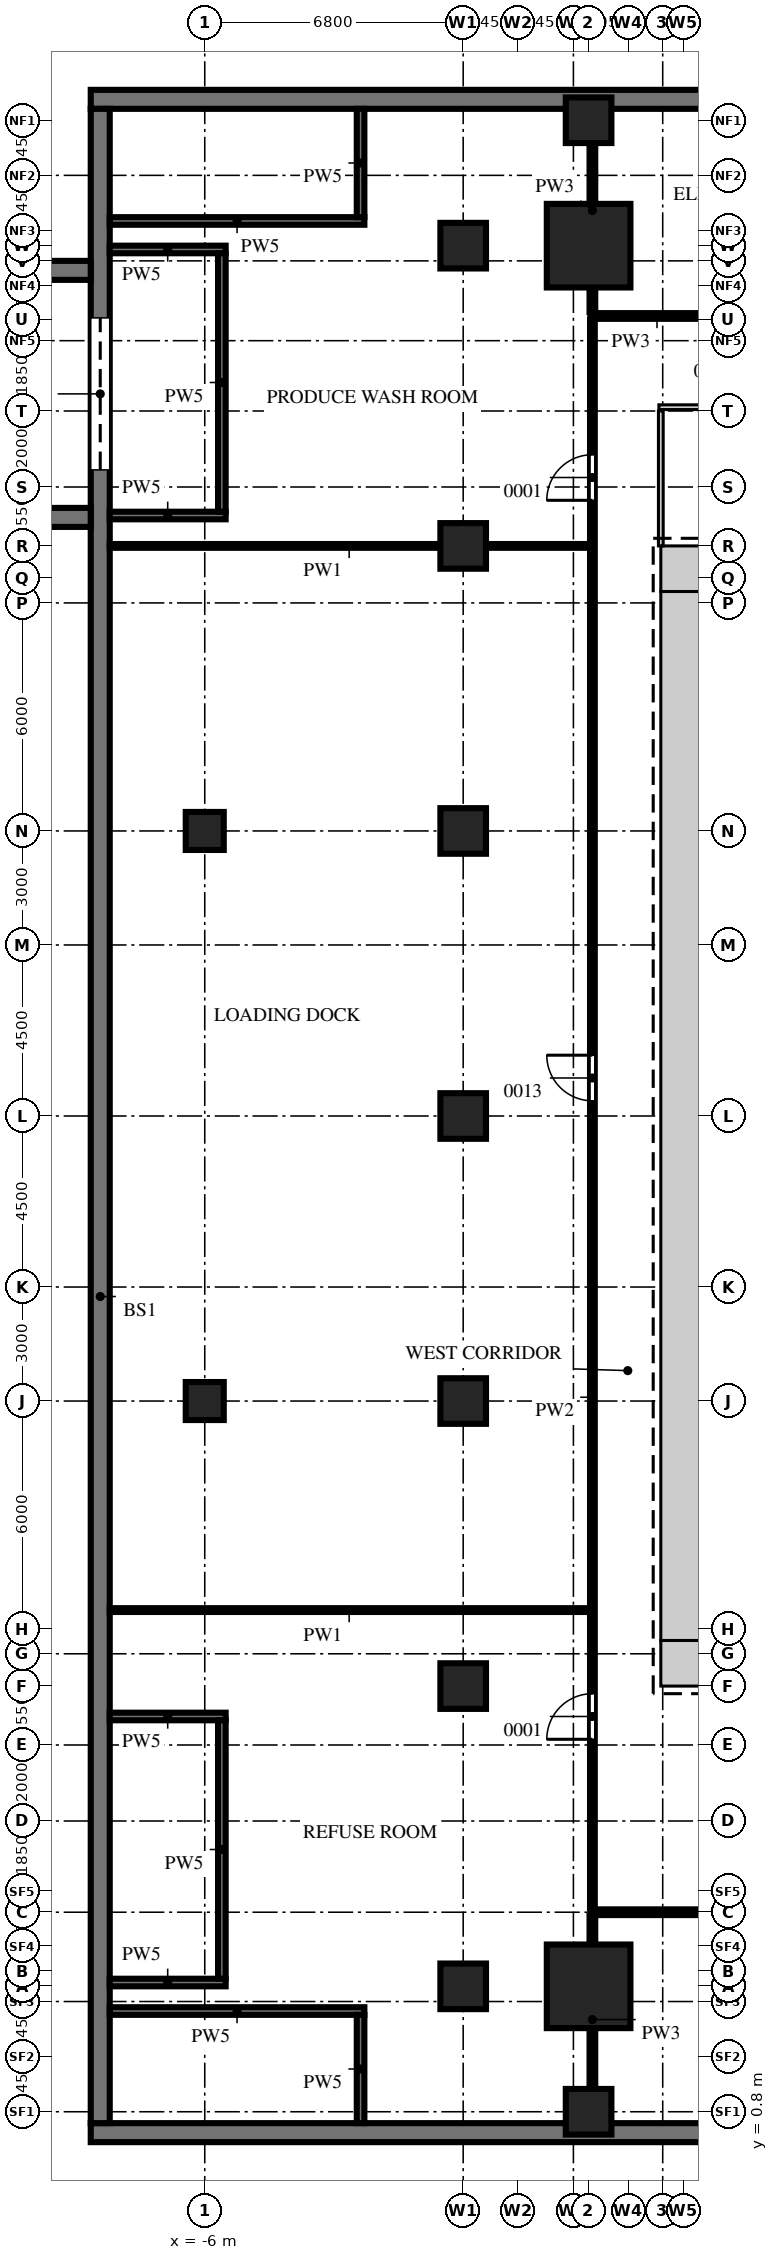
"""IFC4 building model, lengths in metres.
Left out: names, types, materials, properties, quantities, classifications, styles, units other than length and angle.
Written with IfcOpenShell. Run it as: python <this file> out.ifc"""

import sys

from ifc_helpers import new_model, si_unit, direction, frame, frame_2d, origin, origin_2d, place, context, subcontext, project, spatial, rectangle, extrude, source, transform, mapped, element, fill, save


model = new_model("IFC4")
c1 = context("Model", 3, precision=1e-05, world=origin(), true_north=direction((0.0, 1.0)))
c2 = subcontext(c1, "Body", "Model", "MODEL_VIEW")
j1 = project(units=[si_unit("LENGTHUNIT", "METRE"), si_unit("PLANEANGLEUNIT", "RADIAN")], contexts=[c1])
p1 = place(None, origin())
s1 = spatial("IfcSite", under=j1, at=p1, CompositionType="ELEMENT")
p2 = place(p1, origin())
s2 = spatial("IfcBuilding", under=s1, at=p2, CompositionType="ELEMENT")
p3 = place(p2, frame((0.0, 0.0, -4.5)))
s3 = spatial("IfcBuildingStorey", under=s2, at=p3, CompositionType="ELEMENT", Elevation=-4.5)
m1 = source(origin(), c2, "Body", "SweptSolid", [
    extrude(rectangle(XDim=1.2, YDim=1.2, at=frame_2d((0.6, 0.0))), origin(), (0.0, 0.0, 1.0), 4.15),
])
for number, where, z_axis, x_axis in (
    (1, (6.0, 41.4, 0.0), (0.0, 0.0, 1.0), (1.0, 0.0, 0.0)),
    (2, (6.0, 12.6, 0.0), (0.0, 0.0, 1.0), (1.0, 0.0, 0.0)),
):
    element("IfcWall", number, at=place(p3, frame(where, z_axis=z_axis, x_axis=x_axis)), inside=s3, PredefinedType="SHEAR", context=c2, shape_type="MappedRepresentation", body=[
        mapped(m1, transform((0.0, 0.0, 0.0))),
    ])
m2 = source(origin(), c2, "Body", "SweptSolid", [
    extrude(rectangle(XDim=27.6, YDim=1.2, at=frame_2d((13.8, 0.0))), origin(), (0.0, 0.0, 1.0), 4.15),
])
p4 = place(p3, frame((6.6, 13.2, 0.0), z_axis=(0.0, 0.0, 1.0), x_axis=(0.0, 1.0, 0.0)))
e3 = element("IfcWall", 3, at=p4, inside=s3, PredefinedType="SHEAR", context=c2, shape_type="MappedRepresentation", body=[
    mapped(m2, transform((0.0, 0.0, 0.0))),
])
m3 = source(origin(), c2, "Body", "SweptSolid", [
    extrude(rectangle(XDim=90.0, YDim=0.5, at=frame_2d((45.0, 0.0))), origin(), (0.0, 0.0, 1.0), 4.15),
])
for number, where, z_axis, x_axis in (
    (4, (-9.0, 0.25, 0.0), (0.0, 0.0, 1.0), (1.0, 0.0, 0.0)),
    (5, (-9.0, 53.75, 0.0), (0.0, 0.0, 1.0), (1.0, 0.0, 0.0)),
):
    element("IfcWall", number, at=place(p3, frame(where, z_axis=z_axis, x_axis=x_axis)), inside=s3, PredefinedType="STANDARD", context=c2, shape_type="MappedRepresentation", body=[
        mapped(m3, transform((0.0, 0.0, 0.0))),
    ])
m4 = source(origin(), c2, "Body", "SweptSolid", [
    extrude(rectangle(XDim=53.0, YDim=0.5, at=frame_2d((26.5, 0.0))), origin(), (0.0, 0.0, 1.0), 4.15),
])
p5 = place(p3, frame((-8.75, 0.5, 0.0), z_axis=(0.0, 0.0, 1.0), x_axis=(0.0, 1.0, 0.0)))
e6 = element("IfcWall", 6, at=p5, inside=s3, PredefinedType="STANDARD", context=c2, shape_type="MappedRepresentation", body=[
    mapped(m4, transform((0.0, 0.0, 0.0))),
])
m5 = source(origin(), c2, "Body", "SweptSolid", [
    extrude(rectangle(XDim=4.0, YDim=3.2, at=frame_2d((2.0, 1.6))), frame((0.0, 0.26, 0.0), z_axis=(0.0, -1.0, 0.0), x_axis=(1.0, 0.0, 0.0)), (0.0, 0.0, 1.0), 0.52),
])
p6 = place(p5, frame((43.5, 0.0, 0.0)))
e7 = element("IfcOpeningElement", 7, at=p6, cuts=e6, PredefinedType="OPENING", context=c2, shape_type="MappedRepresentation", body=[
    mapped(m5, transform((0.0, 0.0, 0.0))),
])
m6 = source(origin(), c2, "Body", "SweptSolid", [
    extrude(rectangle(XDim=2.2, YDim=2.2, at=origin_2d()), origin(), (0.0, 0.0, 1.0), 4.5),
])
for number, where, z_axis, x_axis in (
    (8, (4.1, 49.9, 0.0), (0.0, 0.0, 1.0), (1.0, 0.0, 0.0)),
    (9, (4.1, 4.1, 0.0), (0.0, 0.0, 1.0), (1.0, 0.0, 0.0)),
):
    element("IfcColumn", number, at=place(p3, frame(where, z_axis=z_axis, x_axis=x_axis)), inside=s3, PredefinedType="COLUMN", context=c2, shape_type="MappedRepresentation", body=[
        mapped(m6, transform((0.0, 0.0, 0.0))),
    ])
m7 = source(origin(), c2, "Body", "SweptSolid", [
    extrude(rectangle(XDim=1.2, YDim=1.2, at=origin_2d()), origin(), (0.0, 0.0, 1.0), 4.15),
])
for number, where, z_axis, x_axis in (
    (10, (4.1, 0.8, 0.0), (0.0, 0.0, 1.0), (1.0, 0.0, 0.0)),
    (11, (4.1, 53.2, 0.0), (0.0, 0.0, 1.0), (1.0, 0.0, 0.0)),
    (12, (0.8, 4.1, 0.0), (0.0, 0.0, 1.0), (1.0, 0.0, 0.0)),
    (13, (0.8, 12.0, 0.0), (0.0, 0.0, 1.0), (1.0, 0.0, 0.0)),
    (14, (0.8, 19.5, 0.0), (0.0, 0.0, 1.0), (1.0, 0.0, 0.0)),
    (15, (0.8, 27.0, 0.0), (0.0, 0.0, 1.0), (1.0, 0.0, 0.0)),
    (16, (0.8, 34.5, 0.0), (0.0, 0.0, 1.0), (1.0, 0.0, 0.0)),
    (17, (0.8, 42.0, 0.0), (0.0, 0.0, 1.0), (1.0, 0.0, 0.0)),
    (18, (0.8, 49.9, 0.0), (0.0, 0.0, 1.0), (1.0, 0.0, 0.0)),
):
    element("IfcColumn", number, at=place(p3, frame(where, z_axis=z_axis, x_axis=x_axis)), inside=s3, PredefinedType="COLUMN", context=c2, shape_type="MappedRepresentation", body=[
        mapped(m7, transform((0.0, 0.0, 0.0))),
    ])
m8 = source(origin(), c2, "Body", "SweptSolid", [
    extrude(rectangle(XDim=1.0, YDim=1.0, at=origin_2d()), origin(), (0.0, 0.0, 1.0), 4.15),
])
for number, where, z_axis, x_axis in (
    (19, (-6.0, 19.5, 0.0), (0.0, 0.0, 1.0), (1.0, 0.0, 0.0)),
    (20, (-6.0, 34.5, 0.0), (0.0, 0.0, 1.0), (1.0, 0.0, 0.0)),
):
    element("IfcColumn", number, at=place(p3, frame(where, z_axis=z_axis, x_axis=x_axis)), inside=s3, PredefinedType="COLUMN", context=c2, shape_type="MappedRepresentation", body=[
        mapped(m8, transform((0.0, 0.0, 0.0))),
    ])
m9 = source(origin(), c2, "Body", "SweptSolid", [
    extrude(rectangle(XDim=11.098, YDim=0.5, at=frame_2d((5.549, 0.0))), origin(), (0.0, 0.0, 1.0), 4.1),
])
for number, where, z_axis, x_axis in (
    (21, (-20.098, 42.75, 0.0), (0.0, 0.0, 1.0), (1.0, 0.0, 0.0)),
    (22, (-20.098, 49.25, 0.0), (0.0, 0.0, 1.0), (1.0, 0.0, 0.0)),
):
    element("IfcWall", number, at=place(p3, frame(where, z_axis=z_axis, x_axis=x_axis)), inside=s3, PredefinedType="SOLIDWALL", context=c2, shape_type="MappedRepresentation", body=[
        mapped(m9, transform((0.0, 0.0, 0.0))),
    ])
m10 = source(origin(), c2, "Body", "SweptSolid", [
    extrude(rectangle(XDim=5.45, YDim=0.15, at=frame_2d((2.725, 0.0))), origin(), (0.0, 0.0, 1.0), 4.15),
])
p7 = place(p3, frame((4.2, 0.5, 0.0), z_axis=(0.0, 0.0, 1.0), x_axis=(0.0, 1.0, 0.0)))
e23 = element("IfcWall", 23, at=p7, inside=s3, PredefinedType="PARTITIONING", context=c2, shape_type="MappedRepresentation", body=[
    mapped(m10, transform((0.0, 0.0, 0.0))),
])
m11 = source(origin(), c2, "Body", "SweptSolid", [
    extrude(rectangle(XDim=22.3, YDim=0.15, at=frame_2d((11.15, 0.0))), origin(), (0.0, 0.0, 1.0), 4.15),
])
p8 = place(p3, frame((4.15, 6.05, 0.0), z_axis=(0.0, 0.0, 1.0), x_axis=(1.0, 0.0, 0.0)))
e24 = element("IfcWall", 24, at=p8, inside=s3, PredefinedType="PARTITIONING", context=c2, shape_type="MappedRepresentation", body=[
    mapped(m11, transform((0.0, 0.0, 0.0))),
])
m12 = source(origin(), c2, "Body", "SweptSolid", [
    extrude(rectangle(XDim=1.2, YDim=2.1, at=frame_2d((0.6, 1.05))), frame((0.0, 0.085, 0.0), z_axis=(0.0, -1.0, 0.0), x_axis=(1.0, 0.0, 0.0)), (0.0, 0.0, 1.0), 0.17),
])
p9 = place(p8, frame((9.2, 0.0, 0.0)))
e25 = element("IfcOpeningElement", 25, at=p9, cuts=e24, PredefinedType="OPENING", context=c2, shape_type="MappedRepresentation", body=[
    mapped(m12, transform((0.0, 0.0, 0.0))),
])
m13 = source(origin(), c2, "Body", "SweptSolid", [
    extrude(rectangle(XDim=41.8, YDim=0.125, at=frame_2d((20.9, 0.0))), origin(), (0.0, 0.0, 1.0), 4.15),
])
p10 = place(p3, frame((4.2, 6.15, 0.0), z_axis=(0.0, 0.0, 1.0), x_axis=(0.0, 1.0, 0.0)))
e26 = element("IfcWall", 26, at=p10, inside=s3, PredefinedType="PARTITIONING", context=c2, shape_type="MappedRepresentation", body=[
    mapped(m13, transform((0.0, 0.0, 0.0))),
])
m14 = source(origin(), c2, "Body", "SweptSolid", [
    extrude(rectangle(XDim=1.2, YDim=2.1, at=frame_2d((0.6, 1.05))), frame((0.0, 0.073, 0.0), z_axis=(0.0, -1.0, 0.0), x_axis=(1.0, 0.0, 0.0)), (0.0, 0.0, 1.0), 0.145),
])
p11 = place(p10, frame((4.45, 0.0, 0.0)))
e27 = element("IfcOpeningElement", 27, at=p11, cuts=e26, PredefinedType="OPENING", context=c2, shape_type="MappedRepresentation", body=[
    mapped(m14, transform((0.0, 0.0, 0.0))),
])
p12 = place(p10, frame((21.25, 0.0, 0.0)))
e28 = element("IfcOpeningElement", 28, at=p12, cuts=e26, PredefinedType="OPENING", context=c2, shape_type="MappedRepresentation", body=[
    mapped(m14, transform((0.0, 0.0, 0.0))),
])
p13 = place(p10, frame((37.05, 0.0, 0.0)))
e29 = element("IfcOpeningElement", 29, at=p13, cuts=e26, PredefinedType="OPENING", context=c2, shape_type="MappedRepresentation", body=[
    mapped(m14, transform((0.0, 0.0, 0.0))),
])
m15 = source(origin(), c2, "Body", "SweptSolid", [
    extrude(rectangle(XDim=12.6, YDim=0.1, at=frame_2d((6.3, 0.0))), origin(), (0.0, 0.0, 1.0), 4.15),
])
for number, where, z_axis, x_axis in (
    (30, (-8.5, 14.0, 0.0), (0.0, 0.0, 1.0), (1.0, 0.0, 0.0)),
    (31, (-8.5, 42.0, 0.0), (0.0, 0.0, 1.0), (1.0, 0.0, 0.0)),
):
    element("IfcWall", number, at=place(p3, frame(where, z_axis=z_axis, x_axis=x_axis)), inside=s3, PredefinedType="PARTITIONING", context=c2, shape_type="MappedRepresentation", body=[
        mapped(m15, transform((0.0, 0.0, 0.0))),
    ])
m16 = source(origin(), c2, "Body", "SweptSolid", [
    extrude(rectangle(XDim=3.55, YDim=0.125, at=frame_2d((1.775, 0.0))), origin(), (0.0, 0.0, 1.0), 4.15),
])
p14 = place(p3, frame((6.0, 42.0, 0.0), z_axis=(0.0, 0.0, 1.0), x_axis=(0.0, 1.0, 0.0)))
e32 = element("IfcWall", 32, at=p14, inside=s3, PredefinedType="PARTITIONING", context=c2, shape_type="MappedRepresentation", body=[
    mapped(m16, transform((0.0, 0.0, 0.0))),
])
m17 = source(origin(), c2, "Body", "SweptSolid", [
    extrude(rectangle(XDim=7.95, YDim=0.125, at=frame_2d((3.975, 0.0))), origin(), (0.0, 0.0, 1.0), 4.15),
])
p15 = place(p3, frame((5.95, 45.65, 0.0), z_axis=(0.0, 0.0, 1.0), x_axis=(1.0, 0.0, 0.0)))
e33 = element("IfcWall", 33, at=p15, inside=s3, PredefinedType="PARTITIONING", context=c2, shape_type="MappedRepresentation", body=[
    mapped(m17, transform((0.0, 0.0, 0.0))),
])
m18 = source(origin(), c2, "Body", "SweptSolid", [
    extrude(rectangle(XDim=0.9, YDim=2.1, at=frame_2d((0.45, 1.05))), frame((0.0, 0.073, 0.0), z_axis=(0.0, -1.0, 0.0), x_axis=(1.0, 0.0, 0.0)), (0.0, 0.0, 1.0), 0.145),
])
p16 = place(p15, frame((3.55, 0.0, 0.0)))
e34 = element("IfcOpeningElement", 34, at=p16, cuts=e33, PredefinedType="OPENING", context=c2, shape_type="MappedRepresentation", body=[
    mapped(m18, transform((0.0, 0.0, 0.0))),
])
m19 = source(origin(), c2, "Body", "SweptSolid", [
    extrude(rectangle(XDim=7.8, YDim=0.15, at=frame_2d((3.9, 0.0))), origin(), (0.0, 0.0, 1.0), 4.15),
])
p17 = place(p3, frame((4.15, 48.05, 0.0), z_axis=(0.0, 0.0, 1.0), x_axis=(1.0, 0.0, 0.0)))
e35 = element("IfcWall", 35, at=p17, inside=s3, PredefinedType="PARTITIONING", context=c2, shape_type="MappedRepresentation", body=[
    mapped(m19, transform((0.0, 0.0, 0.0))),
])
m20 = source(origin(), c2, "Body", "SweptSolid", [
    extrude(rectangle(XDim=0.9, YDim=2.1, at=frame_2d((0.45, 1.05))), frame((0.0, 0.085, 0.0), z_axis=(0.0, -1.0, 0.0), x_axis=(1.0, 0.0, 0.0)), (0.0, 0.0, 1.0), 0.17),
])
p18 = place(p17, frame((3.5, 0.0, 0.0)))
e36 = element("IfcOpeningElement", 36, at=p18, cuts=e35, PredefinedType="OPENING", context=c2, shape_type="MappedRepresentation", body=[
    mapped(m20, transform((0.0, 0.0, 0.0))),
])
m21 = source(origin(), c2, "Body", "SweptSolid", [
    extrude(rectangle(XDim=5.35, YDim=0.15, at=frame_2d((2.675, 0.0))), origin(), (0.0, 0.0, 1.0), 4.15),
])
p19 = place(p3, frame((4.2, 48.15, 0.0), z_axis=(0.0, 0.0, 1.0), x_axis=(0.0, 1.0, 0.0)))
e37 = element("IfcWall", 37, at=p19, inside=s3, PredefinedType="PARTITIONING", context=c2, shape_type="MappedRepresentation", body=[
    mapped(m21, transform((0.0, 0.0, 0.0))),
])
m22 = source(origin(), c2, "Body", "SweptSolid", [
    extrude(rectangle(XDim=6.7, YDim=0.2, at=frame_2d((3.35, 0.0))), origin(), (0.0, 0.0, 1.0), 4.15),
])
p20 = place(p3, frame((-8.5, 3.45, 0.0), z_axis=(0.0, 0.0, 1.0), x_axis=(1.0, 0.0, 0.0)))
e38 = element("IfcWall", 38, at=p20, inside=s3, PredefinedType="PARTITIONING", context=c2, shape_type="MappedRepresentation", body=[
    mapped(m22, transform((0.0, 0.0, 0.0))),
])
m23 = source(origin(), c2, "Body", "SweptSolid", [
    extrude(rectangle(XDim=2.85, YDim=0.2, at=frame_2d((1.425, 0.0))), origin(), (0.0, 0.0, 1.0), 4.15),
])
p21 = place(p3, frame((-1.9, 0.5, 0.0), z_axis=(0.0, 0.0, 1.0), x_axis=(0.0, 1.0, 0.0)))
e39 = element("IfcWall", 39, at=p21, inside=s3, PredefinedType="PARTITIONING", context=c2, shape_type="MappedRepresentation", body=[
    mapped(m23, transform((0.0, 0.0, 0.0))),
])
m24 = source(origin(), c2, "Body", "SweptSolid", [
    extrude(rectangle(XDim=3.05, YDim=0.2, at=frame_2d((1.525, 0.0))), origin(), (0.0, 0.0, 1.0), 4.15),
])
for number, where, z_axis, x_axis in (
    (40, (-8.5, 4.2, 0.0), (0.0, 0.0, 1.0), (1.0, 0.0, 0.0)),
    (41, (-8.5, 11.2, 0.0), (0.0, 0.0, 1.0), (1.0, 0.0, 0.0)),
):
    element("IfcWall", number, at=place(p3, frame(where, z_axis=z_axis, x_axis=x_axis)), inside=s3, PredefinedType="PARTITIONING", context=c2, shape_type="MappedRepresentation", body=[
        mapped(m24, transform((0.0, 0.0, 0.0))),
    ])
m25 = source(origin(), c2, "Body", "SweptSolid", [
    extrude(rectangle(XDim=6.8, YDim=0.2, at=frame_2d((3.4, 0.0))), origin(), (0.0, 0.0, 1.0), 4.15),
])
p22 = place(p3, frame((-5.55, 4.3, 0.0), z_axis=(0.0, 0.0, 1.0), x_axis=(0.0, 1.0, 0.0)))
e42 = element("IfcWall", 42, at=p22, inside=s3, PredefinedType="PARTITIONING", context=c2, shape_type="MappedRepresentation", body=[
    mapped(m25, transform((0.0, 0.0, 0.0))),
])
p23 = place(p3, frame((-8.5, 50.55, 0.0), z_axis=(0.0, 0.0, 1.0), x_axis=(1.0, 0.0, 0.0)))
e43 = element("IfcWall", 43, at=p23, inside=s3, PredefinedType="PARTITIONING", context=c2, shape_type="MappedRepresentation", body=[
    mapped(m22, transform((0.0, 0.0, 0.0))),
])
p24 = place(p3, frame((-1.9, 50.65, 0.0), z_axis=(0.0, 0.0, 1.0), x_axis=(0.0, 1.0, 0.0)))
e44 = element("IfcWall", 44, at=p24, inside=s3, PredefinedType="PARTITIONING", context=c2, shape_type="MappedRepresentation", body=[
    mapped(m23, transform((0.0, 0.0, 0.0))),
])
for number, where, z_axis, x_axis in (
    (45, (-8.5, 42.8, 0.0), (0.0, 0.0, 1.0), (1.0, 0.0, 0.0)),
    (46, (-8.5, 49.8, 0.0), (0.0, 0.0, 1.0), (1.0, 0.0, 0.0)),
):
    element("IfcWall", number, at=place(p3, frame(where, z_axis=z_axis, x_axis=x_axis)), inside=s3, PredefinedType="PARTITIONING", context=c2, shape_type="MappedRepresentation", body=[
        mapped(m24, transform((0.0, 0.0, 0.0))),
    ])
p25 = place(p3, frame((-5.55, 42.9, 0.0), z_axis=(0.0, 0.0, 1.0), x_axis=(0.0, 1.0, 0.0)))
e47 = element("IfcWall", 47, at=p25, inside=s3, PredefinedType="PARTITIONING", context=c2, shape_type="MappedRepresentation", body=[
    mapped(m25, transform((0.0, 0.0, 0.0))),
])
m26 = source(origin(), c2, "Body", "SweptSolid", [
    extrude(rectangle(XDim=4.0, YDim=3.2, at=frame_2d((2.0, 1.6))), frame((0.0, 0.2, 0.0), z_axis=(0.0, -1.0, 0.0), x_axis=(1.0, 0.0, 0.0)), (0.0, 0.0, 1.0), 0.4),
])
p26 = place(p6, origin())
e48 = element("IfcDoor", 48, at=p26, inside=s3, OperationType="ROLLINGUP", PredefinedType="GATE", context=c2, shape_type="MappedRepresentation", body=[
    mapped(m26, transform((0.0, 0.0, 0.0))),
])
fill(e7, e48)
m27 = source(origin(), c2, "Body", "SweptSolid", [
    extrude(rectangle(XDim=1.2, YDim=2.1, at=frame_2d((0.6, 1.05))), frame((0.0, 0.025, 0.0), z_axis=(0.0, -1.0, 0.0), x_axis=(1.0, 0.0, 0.0)), (0.0, 0.0, 1.0), 0.05),
])
p27 = place(p11, origin())
e49 = element("IfcDoor", 49, at=p27, inside=s3, OperationType="SINGLE_SWING_RIGHT", PredefinedType="DOOR", context=c2, shape_type="MappedRepresentation", body=[
    mapped(m27, transform((0.0, 0.0, 0.0))),
])
fill(e27, e49)
p28 = place(p12, origin())
e50 = element("IfcDoor", 50, at=p28, inside=s3, OperationType="SINGLE_SWING_LEFT", PredefinedType="DOOR", context=c2, shape_type="MappedRepresentation", body=[
    mapped(m27, transform((0.0, 0.0, 0.0))),
])
fill(e28, e50)
p29 = place(p13, origin())
e51 = element("IfcDoor", 51, at=p29, inside=s3, OperationType="SINGLE_SWING_RIGHT", PredefinedType="DOOR", context=c2, shape_type="MappedRepresentation", body=[
    mapped(m27, transform((0.0, 0.0, 0.0))),
])
fill(e29, e51)
save(model, sys.argv[1])
